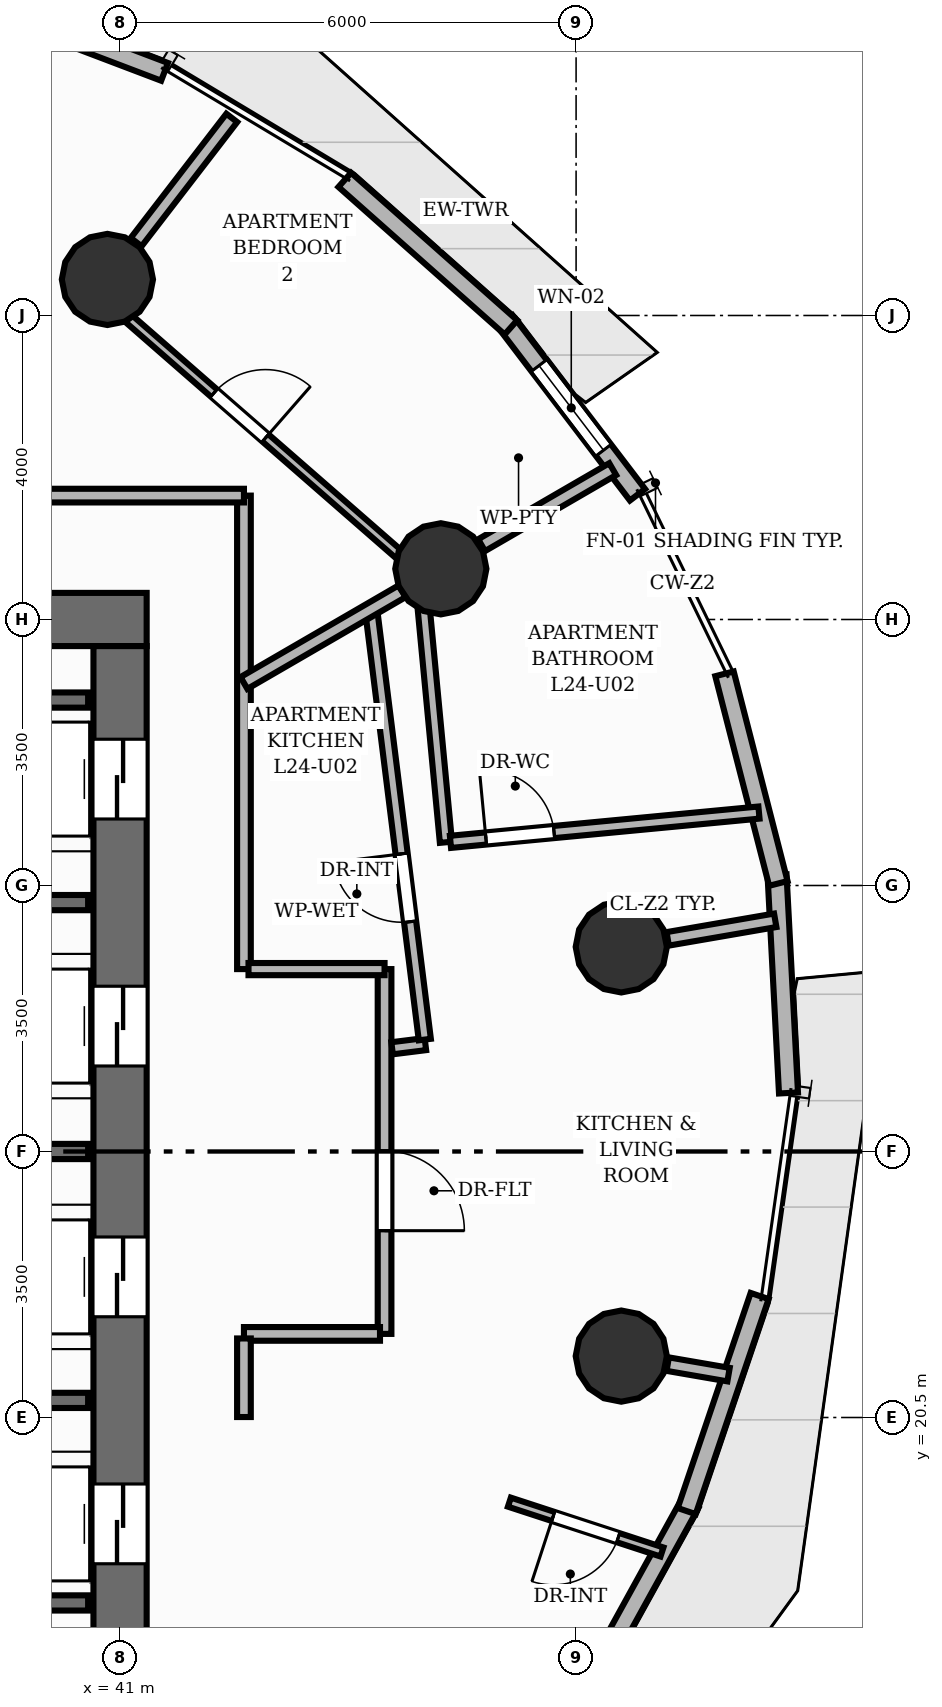
"""IFC4 building model, lengths in metres.
Left out: names, types, materials, properties, quantities, classifications, styles, units other than length and angle.
Written with IfcOpenShell. Run it as: python <this file> out.ifc"""

import sys

from ifc_helpers import new_model, si_unit, direction, frame, frame_2d, origin, origin_2d, place, context, subcontext, project, spatial, rectangle, circle, extrude, element, fill, save


model = new_model("IFC4")
c1 = context("Model", 3, precision=1e-05, world=origin(), true_north=direction((0.0, 1.0)))
c2 = subcontext(c1, "Body", "Model", "MODEL_VIEW")
j1 = project(units=[si_unit("LENGTHUNIT", "METRE"), si_unit("PLANEANGLEUNIT", "RADIAN")], contexts=[c1])
p1 = place(None, origin())
s1 = spatial("IfcSite", under=j1, at=p1, CompositionType="ELEMENT")
p2 = place(p1, origin())
s2 = spatial("IfcBuilding", under=s1, at=p2, CompositionType="ELEMENT")
p3 = place(p2, frame((0.0, 0.0, 83.68)))
s3 = spatial("IfcBuildingStorey", under=s2, at=p3, CompositionType="ELEMENT", Elevation=83.68)
p4 = place(p3, frame((22.65, 31.0, 0.0), z_axis=(0.0, 0.0, 1.0), x_axis=(1.0, 0.0, 0.0)))
e1 = element("IfcWall", 1, at=p4, inside=s3, PredefinedType="SHEAR", context=c2, shape_type="SweptSolid", body=[
    extrude(rectangle(XDim=18.7, YDim=0.7, at=frame_2d((9.35, 0.0))), origin(), (0.0, 0.0, 1.0), 3.2),
])
p5 = place(p4, frame((11.75, 0.0, 0.0)))
e2 = element("IfcOpeningElement", 2, at=p5, cuts=e1, PredefinedType="OPENING", context=c2, shape_type="SweptSolid", body=[
    extrude(rectangle(XDim=1.1, YDim=2.15, at=frame_2d((0.55, 1.075))), frame((0.0, 0.36, 0.0), z_axis=(0.0, -1.0, 0.0), x_axis=(1.0, 0.0, 0.0)), (0.0, 0.0, 1.0), 0.72),
])
p6 = place(p3, frame((41.0, 17.35, 0.0), z_axis=(0.0, 0.0, 1.0), x_axis=(0.0, 1.0, 0.0)))
e3 = element("IfcWall", 3, at=p6, inside=s3, PredefinedType="SHEAR", context=c2, shape_type="SweptSolid", body=[
    extrude(rectangle(XDim=13.3, YDim=0.7, at=frame_2d((6.65, 0.0))), origin(), (0.0, 0.0, 1.0), 3.2),
])
p7 = place(p6, frame((1.225, 0.0, 0.0)))
e4 = element("IfcOpeningElement", 4, at=p7, cuts=e3, PredefinedType="OPENING", context=c2, shape_type="SweptSolid", body=[
    extrude(rectangle(XDim=1.05, YDim=2.15, at=frame_2d((0.525, 1.075))), frame((0.0, 0.36, 0.0), z_axis=(0.0, -1.0, 0.0), x_axis=(1.0, 0.0, 0.0)), (0.0, 0.0, 1.0), 0.72),
])
p8 = place(p6, frame((4.475, 0.0, 0.0)))
e5 = element("IfcOpeningElement", 5, at=p8, cuts=e3, PredefinedType="OPENING", context=c2, shape_type="SweptSolid", body=[
    extrude(rectangle(XDim=1.05, YDim=2.15, at=frame_2d((0.525, 1.075))), frame((0.0, 0.36, 0.0), z_axis=(0.0, -1.0, 0.0), x_axis=(1.0, 0.0, 0.0)), (0.0, 0.0, 1.0), 0.72),
])
p9 = place(p6, frame((7.775, 0.0, 0.0)))
e6 = element("IfcOpeningElement", 6, at=p9, cuts=e3, PredefinedType="OPENING", context=c2, shape_type="SweptSolid", body=[
    extrude(rectangle(XDim=1.05, YDim=2.15, at=frame_2d((0.525, 1.075))), frame((0.0, 0.36, 0.0), z_axis=(0.0, -1.0, 0.0), x_axis=(1.0, 0.0, 0.0)), (0.0, 0.0, 1.0), 0.72),
])
p10 = place(p6, frame((11.025, 0.0, 0.0)))
e7 = element("IfcOpeningElement", 7, at=p10, cuts=e3, PredefinedType="OPENING", context=c2, shape_type="SweptSolid", body=[
    extrude(rectangle(XDim=1.05, YDim=2.15, at=frame_2d((0.525, 1.075))), frame((0.0, 0.36, 0.0), z_axis=(0.0, -1.0, 0.0), x_axis=(1.0, 0.0, 0.0)), (0.0, 0.0, 1.0), 0.72),
])
for number, where, z_axis, x_axis in (
    (8, (47.594, 26.692, 0.0), (0.0, 0.0, 1.0), (1.0, 0.0, 0.0)),
    (9, (45.22, 31.667, 0.0), (0.0, 0.0, 1.0), (1.0, 0.0, 0.0)),
    (10, (40.833, 35.474, 0.0), (0.0, 0.0, 1.0), (1.0, 0.0, 0.0)),
    (11, (47.594, 21.308, 0.0), (0.0, 0.0, 1.0), (1.0, 0.0, 0.0)),
):
    element("IfcColumn", number, at=place(p3, frame(where, z_axis=z_axis, x_axis=x_axis)), inside=s3, PredefinedType="COLUMN", context=c2, shape_type="SweptSolid", body=[
        extrude(circle(Radius=0.6, at=origin_2d()), origin(), (0.0, 0.0, 1.0), 3.2),
    ])
p11 = place(p3, frame((46.065, 34.927, 0.0), z_axis=(0.0, 0.0, 1.0), x_axis=(0.606166055027, -0.795338112838, 0.0)))
e12 = element("IfcWall", 12, at=p11, inside=s3, PredefinedType="SOLIDWALL", context=c2, shape_type="SweptSolid", body=[
    extrude(rectangle(XDim=2.874, YDim=0.25, at=frame_2d((1.437, 0.0))), origin(), (0.0, 0.0, 1.0), 2.96),
])
p12 = place(p11, frame((0.737, 0.0, 0.85)))
e13 = element("IfcOpeningElement", 13, at=p12, cuts=e12, PredefinedType="OPENING", context=c2, shape_type="SweptSolid", body=[
    extrude(rectangle(XDim=1.4, YDim=1.37, at=frame_2d((0.7, 0.685))), frame((0.0, 0.135, 0.0), z_axis=(0.0, -1.0, 0.0), x_axis=(1.0, 0.0, 0.0)), (0.0, 0.0, 1.0), 0.27),
])
p13 = place(p3, frame((43.957, 36.784, 0.0), z_axis=(0.0, 0.0, 1.0), x_axis=(0.747828492436, -0.663891968547, 0.0)))
e14 = element("IfcWall", 14, at=p13, inside=s3, PredefinedType="SOLIDWALL", context=c2, shape_type="SweptSolid", body=[
    extrude(rectangle(XDim=2.923, YDim=0.25, at=frame_2d((1.461, 0.0))), origin(), (0.0, 0.0, 1.0), 2.96),
])
p14 = place(p3, frame((38.724, 39.293, 0.0), z_axis=(0.0, 0.0, 1.0), x_axis=(0.934815891493, -0.355132720277, 0.0)))
e15 = element("IfcWall", 15, at=p14, inside=s3, PredefinedType="SOLIDWALL", context=c2, shape_type="SweptSolid", body=[
    extrude(rectangle(XDim=3.061, YDim=0.25, at=frame_2d((1.53, 0.0))), origin(), (0.0, 0.0, 1.0), 2.96),
])
p15 = place(p3, frame((48.5, 19.371, 0.0), z_axis=(0.0, 0.0, 1.0), x_axis=(-0.482904421948, -0.875673066426, 0.0)))
e16 = element("IfcWall", 16, at=p15, inside=s3, PredefinedType="SOLIDWALL", context=c2, shape_type="SweptSolid", body=[
    extrude(rectangle(XDim=3.061, YDim=0.25, at=frame_2d((1.53, 0.0))), origin(), (0.0, 0.0, 1.0), 2.96),
])
p16 = place(p3, frame((49.415, 22.099, 0.0), z_axis=(0.0, 0.0, 1.0), x_axis=(-0.321149814784, -0.947028403198, 0.0)))
e17 = element("IfcWall", 17, at=p16, inside=s3, PredefinedType="SOLIDWALL", context=c2, shape_type="SweptSolid", body=[
    extrude(rectangle(XDim=2.988, YDim=0.25, at=frame_2d((1.494, 0.0))), origin(), (0.0, 0.0, 1.0), 2.96),
])
p17 = place(p3, frame((49.644, 27.64, 0.0), z_axis=(0.0, 0.0, 1.0), x_axis=(0.052411702269, -0.998625562193, 0.0)))
e18 = element("IfcWall", 18, at=p17, inside=s3, PredefinedType="SOLIDWALL", context=c2, shape_type="SweptSolid", body=[
    extrude(rectangle(XDim=2.874, YDim=0.25, at=frame_2d((1.437, 0.0))), origin(), (0.0, 0.0, 1.0), 2.96),
])
p18 = place(p3, frame((48.953, 30.285, 0.0), z_axis=(0.0, 0.0, 1.0), x_axis=(0.248825035787, -0.96854845081, 0.0)))
e19 = element("IfcWall", 19, at=p18, inside=s3, PredefinedType="SOLIDWALL", context=c2, shape_type="SweptSolid", body=[
    extrude(rectangle(XDim=2.847, YDim=0.25, at=frame_2d((1.424, 0.0))), origin(), (0.0, 0.0, 1.0), 2.96),
])
for number, where, z_axis, x_axis in (
    (20, (38.87, 18.06, 0.0), (0.0, 0.0, 1.0), (1.0, 0.0, 0.0)),
    (21, (38.87, 29.94, 0.0), (0.0, 0.0, 1.0), (1.0, 0.0, 0.0)),
    (22, (38.87, 20.725, 0.0), (0.0, 0.0, 1.0), (1.0, 0.0, 0.0)),
    (23, (38.87, 24.0, 0.0), (0.0, 0.0, 1.0), (1.0, 0.0, 0.0)),
    (24, (38.87, 27.275, 0.0), (0.0, 0.0, 1.0), (1.0, 0.0, 0.0)),
):
    element("IfcWall", number, at=place(p3, frame(where, z_axis=z_axis, x_axis=x_axis)), inside=s3, PredefinedType="SHEAR", context=c2, shape_type="SweptSolid", body=[
        extrude(rectangle(XDim=1.71, YDim=0.2, at=frame_2d((0.855, 0.0))), origin(), (0.0, 0.0, 1.0), 3.2),
    ])
p19 = place(p3, frame((48.206, 26.798, 0.0), z_axis=(0.0, 0.0, 1.0), x_axis=(0.985402123708, 0.170242928172, 0.0)))
e25 = element("IfcWall", 25, at=p19, inside=s3, PredefinedType="PARTITIONING", context=c2, shape_type="SweptSolid", body=[
    extrude(rectangle(XDim=1.436, YDim=0.18, at=frame_2d((0.718, 0.0))), origin(), (0.0, 0.0, 1.0), 2.261),
])
p20 = place(p3, frame((45.757, 31.978, 0.0), z_axis=(0.0, 0.0, 1.0), x_axis=(0.865046065875, 0.501692439563, 0.0)))
e26 = element("IfcWall", 26, at=p20, inside=s3, PredefinedType="PARTITIONING", context=c2, shape_type="SweptSolid", body=[
    extrude(rectangle(XDim=1.994, YDim=0.18, at=frame_2d((0.997, 0.0))), origin(), (0.0, 0.0, 1.0), 2.261),
])
p21 = place(p3, frame((41.212, 35.966, 0.0), z_axis=(0.0, 0.0, 1.0), x_axis=(0.609991040385, 0.792408310564, 0.0)))
e27 = element("IfcWall", 27, at=p21, inside=s3, PredefinedType="PARTITIONING", context=c2, shape_type="SweptSolid", body=[
    extrude(rectangle(XDim=2.062, YDim=0.18, at=frame_2d((1.031, 0.0))), origin(), (0.0, 0.0, 1.0), 2.261),
])
p22 = place(p3, frame((48.206, 21.202, 0.0), z_axis=(0.0, 0.0, 1.0), x_axis=(0.985418430365, -0.170148514822, 0.0)))
e28 = element("IfcWall", 28, at=p22, inside=s3, PredefinedType="PARTITIONING", context=c2, shape_type="SweptSolid", body=[
    extrude(rectangle(XDim=0.812, YDim=0.18, at=frame_2d((0.406, 0.0))), origin(), (0.0, 0.0, 1.0), 2.261),
])
p23 = place(p3, frame((44.48, 26.4, 0.0), z_axis=(0.0, 0.0, 1.0), x_axis=(0.0, -1.0, 0.0)))
e29 = element("IfcWall", 29, at=p23, inside=s3, PredefinedType="PARTITIONING", context=c2, shape_type="SweptSolid", body=[
    extrude(rectangle(XDim=4.8, YDim=0.18, at=frame_2d((2.4, 0.0))), origin(), (0.0, 0.0, 1.0), 2.955),
])
p24 = place(p23, frame((2.392, 0.0, 0.0)))
e30 = element("IfcOpeningElement", 30, at=p24, cuts=e29, PredefinedType="OPENING", context=c2, shape_type="SweptSolid", body=[
    extrude(rectangle(XDim=1.05, YDim=2.15, at=frame_2d((0.525, 1.075))), frame((0.0, 0.1, 0.0), z_axis=(0.0, -1.0, 0.0), x_axis=(1.0, 0.0, 0.0)), (0.0, 0.0, 1.0), 0.2),
])
p25 = place(p3, frame((44.42, 21.6, 0.0), z_axis=(0.0, 0.0, 1.0), x_axis=(-1.0, 0.0, 0.0)))
e31 = element("IfcWall", 31, at=p25, inside=s3, PredefinedType="PARTITIONING", context=c2, shape_type="SweptSolid", body=[
    extrude(rectangle(XDim=1.79, YDim=0.18, at=frame_2d((0.895, 0.0))), origin(), (0.0, 0.0, 1.0), 2.261),
])
p26 = place(p3, frame((42.63, 21.54, 0.0), z_axis=(0.0, 0.0, 1.0), x_axis=(0.0, -1.0, 0.0)))
e32 = element("IfcWall", 32, at=p26, inside=s3, PredefinedType="PARTITIONING", context=c2, shape_type="SweptSolid", body=[
    extrude(rectangle(XDim=1.034, YDim=0.18, at=frame_2d((0.517, 0.0))), origin(), (0.0, 0.0, 1.0), 2.955),
])
p27 = place(p3, frame((42.63, 32.63, 0.0), z_axis=(0.0, 0.0, 1.0), x_axis=(0.0, -1.0, 0.0)))
e33 = element("IfcWall", 33, at=p27, inside=s3, PredefinedType="PARTITIONING", context=c2, shape_type="SweptSolid", body=[
    extrude(rectangle(XDim=6.23, YDim=0.18, at=frame_2d((3.115, 0.0))), origin(), (0.0, 0.0, 1.0), 2.955),
])
p28 = place(p3, frame((42.69, 26.4, 0.0), z_axis=(0.0, 0.0, 1.0), x_axis=(1.0, 0.0, 0.0)))
e34 = element("IfcWall", 34, at=p28, inside=s3, PredefinedType="PLUMBINGWALL", context=c2, shape_type="SweptSolid", body=[
    extrude(rectangle(XDim=1.79, YDim=0.16, at=frame_2d((0.895, 0.0))), origin(), (0.0, 0.0, 1.0), 2.261),
])
p29 = place(p3, frame((22.351, 32.63, 0.0), z_axis=(0.0, 0.0, 1.0), x_axis=(1.0, 0.0, 0.0)))
e35 = element("IfcWall", 35, at=p29, inside=s3, PredefinedType="PARTITIONING", context=c2, shape_type="SweptSolid", body=[
    extrude(rectangle(XDim=20.279, YDim=0.18, at=frame_2d((10.14, 0.0))), origin(), (0.0, 0.0, 1.0), 2.955),
])
p30 = place(p29, frame((11.378, 0.0, 0.0)))
e36 = element("IfcOpeningElement", 36, at=p30, cuts=e35, PredefinedType="OPENING", context=c2, shape_type="SweptSolid", body=[
    extrude(rectangle(XDim=1.05, YDim=2.15, at=frame_2d((0.525, 1.075))), frame((0.0, 0.1, 0.0), z_axis=(0.0, -1.0, 0.0), x_axis=(1.0, 0.0, 0.0)), (0.0, 0.0, 1.0), 0.2),
])
p31 = place(p3, frame((44.997, 31.13, 0.0), z_axis=(0.0, 0.0, 1.0), x_axis=(0.094558062352, -0.995519348302, 0.0)))
e37 = element("IfcWall", 37, at=p31, inside=s3, PredefinedType="PLUMBINGWALL", context=c2, shape_type="SweptSolid", body=[
    extrude(rectangle(XDim=3.075, YDim=0.16, at=frame_2d((1.538, 0.0))), origin(), (0.0, 0.0, 1.0), 2.955),
])
p32 = place(p3, frame((45.347, 28.074, 0.0), z_axis=(0.0, 0.0, 1.0), x_axis=(0.995525564748, 0.09449259195, 0.0)))
e38 = element("IfcWall", 38, at=p32, inside=s3, PredefinedType="PLUMBINGWALL", context=c2, shape_type="SweptSolid", body=[
    extrude(rectangle(XDim=4.077, YDim=0.16, at=frame_2d((2.039, 0.0))), origin(), (0.0, 0.0, 1.0), 2.641),
])
p33 = place(p32, frame((0.469, 0.0, 0.0)))
e39 = element("IfcOpeningElement", 39, at=p33, cuts=e38, PredefinedType="OPENING", context=c2, shape_type="SweptSolid", body=[
    extrude(rectangle(XDim=0.9, YDim=2.1, at=frame_2d((0.45, 1.05))), frame((0.0, 0.09, 0.0), z_axis=(0.0, -1.0, 0.0), x_axis=(1.0, 0.0, 0.0)), (0.0, 0.0, 1.0), 0.18),
])
p34 = place(p3, frame((48.13, 18.73, 0.0), z_axis=(0.0, 0.0, 1.0), x_axis=(-0.950573429935, 0.310499845896, 0.0)))
e40 = element("IfcWall", 40, at=p34, inside=s3, PredefinedType="PARTITIONING", context=c2, shape_type="SweptSolid", body=[
    extrude(rectangle(XDim=2.112, YDim=0.125, at=frame_2d((1.056, 0.0))), origin(), (0.0, 0.0, 1.0), 2.955),
])
p35 = place(p34, frame((0.606, 0.0, 0.0)))
e41 = element("IfcOpeningElement", 41, at=p35, cuts=e40, PredefinedType="OPENING", context=c2, shape_type="SweptSolid", body=[
    extrude(rectangle(XDim=0.9, YDim=2.1, at=frame_2d((0.45, 1.05))), frame((0.0, 0.073, 0.0), z_axis=(0.0, -1.0, 0.0), x_axis=(1.0, 0.0, 0.0)), (0.0, 0.0, 1.0), 0.145),
])
p36 = place(p3, frame((44.579, 25.358, 0.0), z_axis=(0.0, 0.0, 1.0), x_axis=(0.992294886409, 0.123898581135, 0.0)))
e42 = element("IfcWall", 42, at=p36, inside=s3, PredefinedType="PLUMBINGWALL", context=c2, shape_type="SweptSolid", body=[
    extrude(rectangle(XDim=0.441, YDim=0.16, at=frame_2d((0.221, 0.0))), origin(), (0.0, 0.0, 1.0), 2.955),
])
p37 = place(p3, frame((45.01, 25.473, 0.0), z_axis=(0.0, 0.0, 1.0), x_axis=(-0.123955741663, 0.992287747636, 0.0)))
e43 = element("IfcWall", 43, at=p37, inside=s3, PredefinedType="PLUMBINGWALL", context=c2, shape_type="SweptSolid", body=[
    extrude(rectangle(XDim=5.706, YDim=0.16, at=frame_2d((2.853, 0.0))), origin(), (0.0, 0.0, 1.0), 2.955),
])
p38 = place(p37, frame((1.563, 0.0, 0.0)))
e44 = element("IfcOpeningElement", 44, at=p38, cuts=e43, PredefinedType="OPENING", context=c2, shape_type="SweptSolid", body=[
    extrude(rectangle(XDim=0.9, YDim=2.1, at=frame_2d((0.45, 1.05))), frame((0.0, 0.09, 0.0), z_axis=(0.0, -1.0, 0.0), x_axis=(1.0, 0.0, 0.0)), (0.0, 0.0, 1.0), 0.18),
])
p39 = place(p3, frame((42.63, 30.165, 0.0), z_axis=(0.0, 0.0, 1.0), x_axis=(0.86502326608, 0.501731750182, 0.0)))
e45 = element("IfcWall", 45, at=p39, inside=s3, PredefinedType="PARTITIONING", context=c2, shape_type="SweptSolid", body=[
    extrude(rectangle(XDim=2.407, YDim=0.18, at=frame_2d((1.204, 0.0))), origin(), (0.0, 0.0, 1.0), 2.261),
])
p40 = place(p3, frame((41.112, 34.96, 0.0), z_axis=(0.0, 0.0, 1.0), x_axis=(0.753425123405, -0.657533712765, 0.0)))
e46 = element("IfcWall", 46, at=p40, inside=s3, PredefinedType="PARTITIONING", context=c2, shape_type="SweptSolid", body=[
    extrude(rectangle(XDim=4.72, YDim=0.125, at=frame_2d((2.36, 0.0))), origin(), (0.0, 0.0, 1.0), 2.404),
])
p41 = place(p40, frame((1.49, 0.0, 0.0)))
e47 = element("IfcOpeningElement", 47, at=p41, cuts=e46, PredefinedType="OPENING", context=c2, shape_type="SweptSolid", body=[
    extrude(rectangle(XDim=0.9, YDim=2.1, at=frame_2d((0.45, 1.05))), frame((0.0, 0.073, 0.0), z_axis=(0.0, -1.0, 0.0), x_axis=(1.0, 0.0, 0.0)), (0.0, 0.0, 1.0), 0.145),
])
p42 = place(p12, origin())
e48 = element("IfcWindow", 48, at=p42, inside=s3, PartitioningType="SINGLE_PANEL", PredefinedType="WINDOW", context=c2, shape_type="SweptSolid", body=[
    extrude(rectangle(XDim=1.4, YDim=1.37, at=frame_2d((0.7, 0.685))), frame((0.0, 0.03, 0.0), z_axis=(0.0, -1.0, 0.0), x_axis=(1.0, 0.0, 0.0)), (0.0, 0.0, 1.0), 0.06),
])
fill(e13, e48)
p43 = place(p7, origin())
e49 = element("IfcDoor", 49, at=p43, inside=s3, OperationType="DOUBLE_DOOR_SLIDING", PredefinedType="DOOR", context=c2, shape_type="SweptSolid", body=[
    extrude(rectangle(XDim=1.05, YDim=2.15, at=frame_2d((0.525, 1.075))), frame((0.0, 0.025, 0.0), z_axis=(0.0, -1.0, 0.0), x_axis=(1.0, 0.0, 0.0)), (0.0, 0.0, 1.0), 0.05),
])
fill(e4, e49)
p44 = place(p8, origin())
e50 = element("IfcDoor", 50, at=p44, inside=s3, OperationType="DOUBLE_DOOR_SLIDING", PredefinedType="DOOR", context=c2, shape_type="SweptSolid", body=[
    extrude(rectangle(XDim=1.05, YDim=2.15, at=frame_2d((0.525, 1.075))), frame((0.0, 0.025, 0.0), z_axis=(0.0, -1.0, 0.0), x_axis=(1.0, 0.0, 0.0)), (0.0, 0.0, 1.0), 0.05),
])
fill(e5, e50)
p45 = place(p9, origin())
e51 = element("IfcDoor", 51, at=p45, inside=s3, OperationType="DOUBLE_DOOR_SLIDING", PredefinedType="DOOR", context=c2, shape_type="SweptSolid", body=[
    extrude(rectangle(XDim=1.05, YDim=2.15, at=frame_2d((0.525, 1.075))), frame((0.0, 0.025, 0.0), z_axis=(0.0, -1.0, 0.0), x_axis=(1.0, 0.0, 0.0)), (0.0, 0.0, 1.0), 0.05),
])
fill(e6, e51)
p46 = place(p10, origin())
e52 = element("IfcDoor", 52, at=p46, inside=s3, OperationType="DOUBLE_DOOR_SLIDING", PredefinedType="DOOR", context=c2, shape_type="SweptSolid", body=[
    extrude(rectangle(XDim=1.05, YDim=2.15, at=frame_2d((0.525, 1.075))), frame((0.0, 0.025, 0.0), z_axis=(0.0, -1.0, 0.0), x_axis=(1.0, 0.0, 0.0)), (0.0, 0.0, 1.0), 0.05),
])
fill(e7, e52)
p47 = place(p24, origin())
e53 = element("IfcDoor", 53, at=p47, inside=s3, OperationType="SINGLE_SWING_RIGHT", PredefinedType="DOOR", context=c2, shape_type="SweptSolid", body=[
    extrude(rectangle(XDim=1.05, YDim=2.15, at=frame_2d((0.525, 1.075))), frame((0.0, 0.025, 0.0), z_axis=(0.0, -1.0, 0.0), x_axis=(1.0, 0.0, 0.0)), (0.0, 0.0, 1.0), 0.05),
])
fill(e30, e53)
p48 = place(p33, origin())
e54 = element("IfcDoor", 54, at=p48, inside=s3, OperationType="SINGLE_SWING_LEFT", PredefinedType="DOOR", context=c2, shape_type="SweptSolid", body=[
    extrude(rectangle(XDim=0.9, YDim=2.1, at=frame_2d((0.45, 1.05))), frame((0.0, 0.025, 0.0), z_axis=(0.0, -1.0, 0.0), x_axis=(1.0, 0.0, 0.0)), (0.0, 0.0, 1.0), 0.05),
])
fill(e39, e54)
p49 = place(p35, origin())
e55 = element("IfcDoor", 55, at=p49, inside=s3, OperationType="SINGLE_SWING_RIGHT", PredefinedType="DOOR", context=c2, shape_type="SweptSolid", body=[
    extrude(rectangle(XDim=0.9, YDim=2.1, at=frame_2d((0.45, 1.05))), frame((0.0, 0.025, 0.0), z_axis=(0.0, -1.0, 0.0), x_axis=(1.0, 0.0, 0.0)), (0.0, 0.0, 1.0), 0.05),
])
fill(e41, e55)
p50 = place(p38, origin())
e56 = element("IfcDoor", 56, at=p50, inside=s3, OperationType="SINGLE_SWING_RIGHT", PredefinedType="DOOR", context=c2, shape_type="SweptSolid", body=[
    extrude(rectangle(XDim=0.9, YDim=2.1, at=frame_2d((0.45, 1.05))), frame((0.0, 0.025, 0.0), z_axis=(0.0, -1.0, 0.0), x_axis=(1.0, 0.0, 0.0)), (0.0, 0.0, 1.0), 0.05),
])
fill(e44, e56)
p51 = place(p41, origin())
e57 = element("IfcDoor", 57, at=p51, inside=s3, OperationType="SINGLE_SWING_RIGHT", PredefinedType="DOOR", context=c2, shape_type="SweptSolid", body=[
    extrude(rectangle(XDim=0.9, YDim=2.1, at=frame_2d((0.45, 1.05))), frame((0.0, 0.025, 0.0), z_axis=(0.0, -1.0, 0.0), x_axis=(1.0, 0.0, 0.0)), (0.0, 0.0, 1.0), 0.05),
])
fill(e47, e57)
save(model, sys.argv[1])
